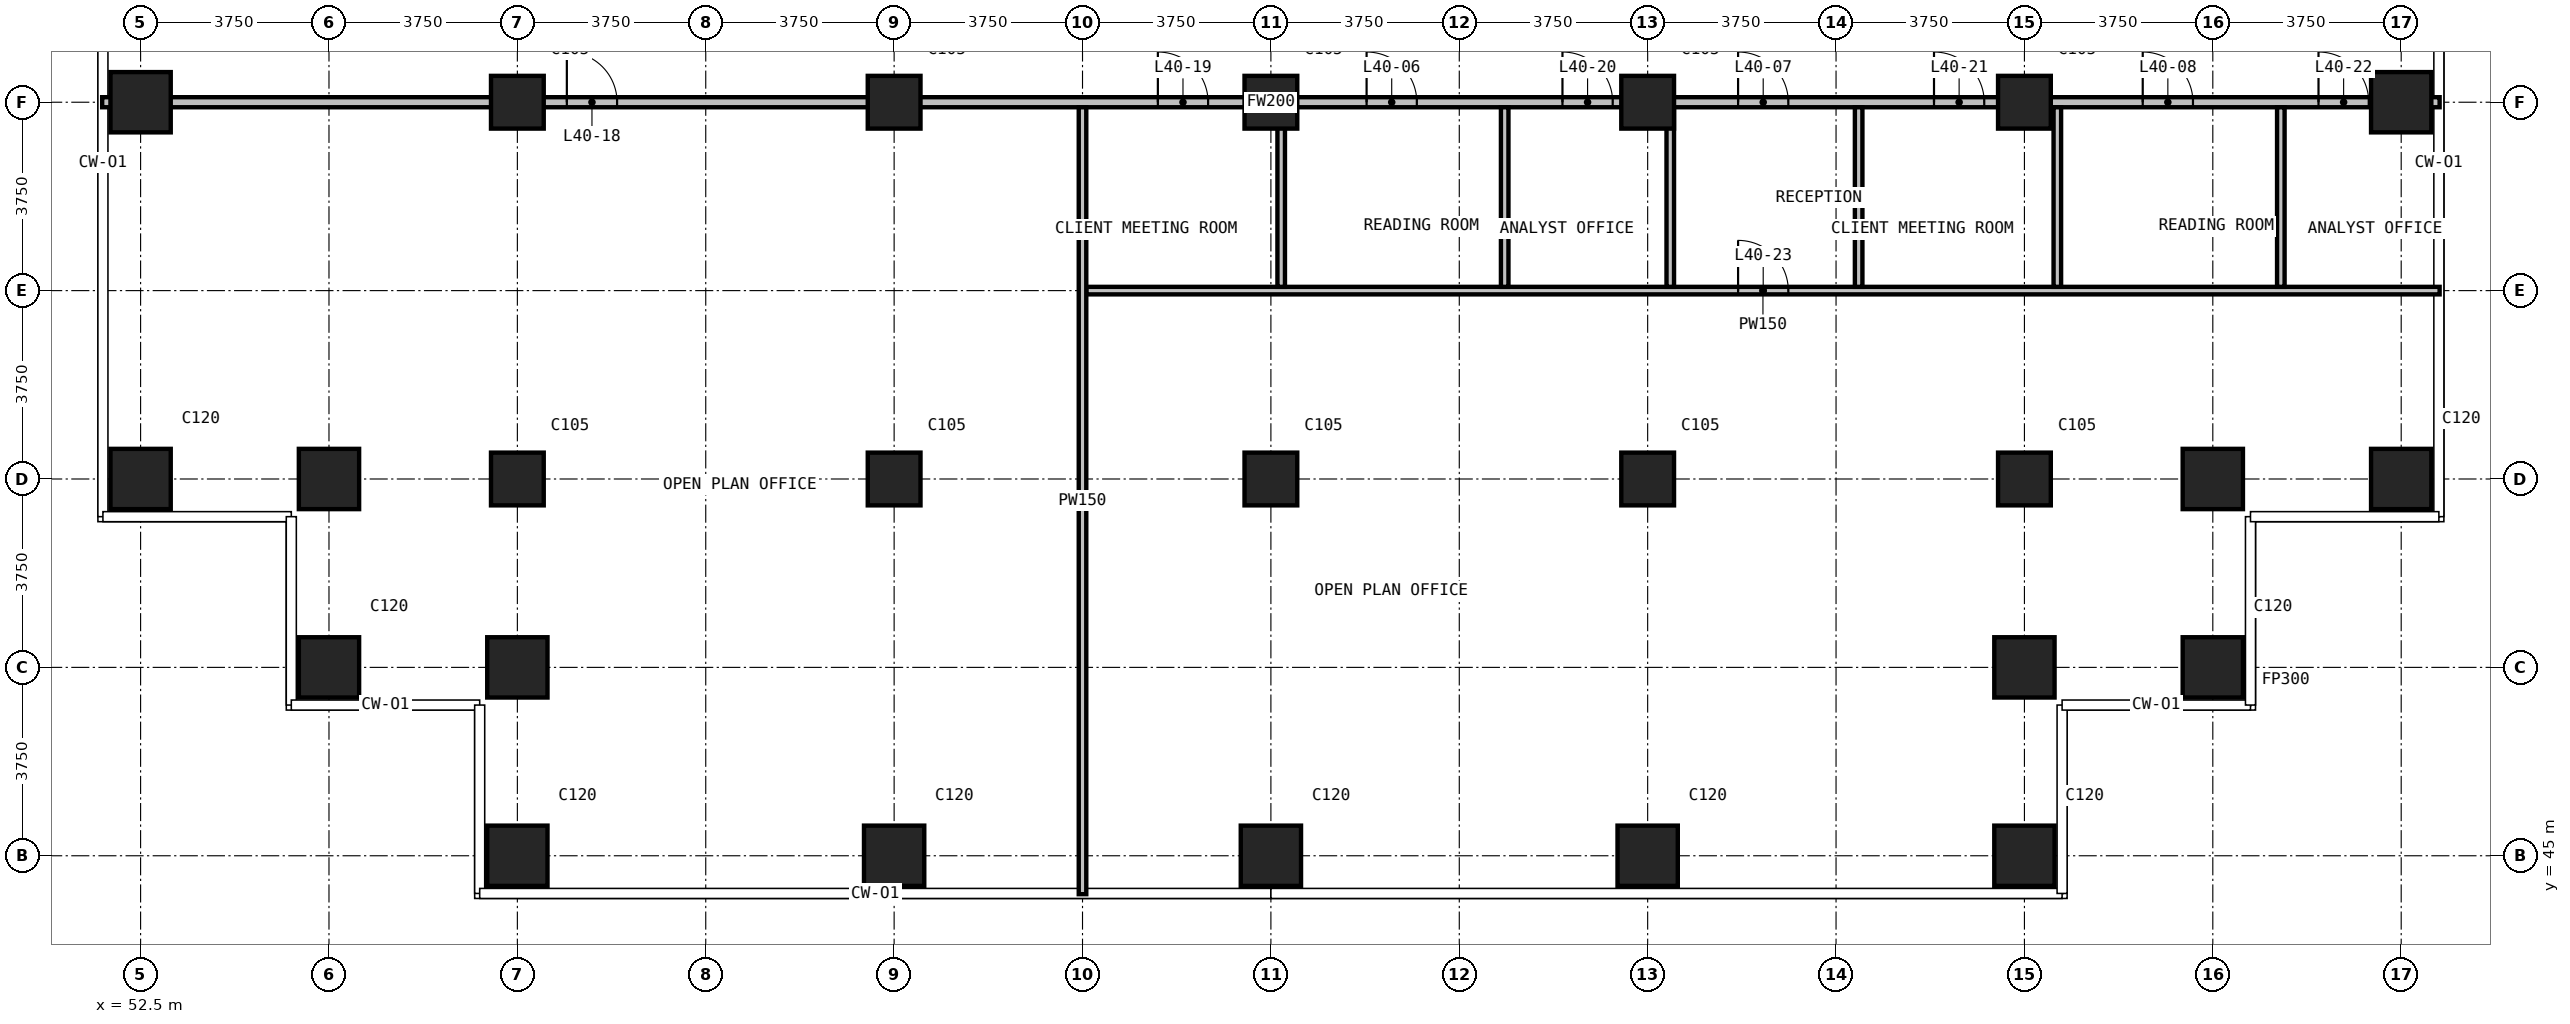
"""IFC4 building model, lengths in metres.
Left out: names, types, materials, properties, quantities, classifications, styles, units other than length and angle.
Written with IfcOpenShell. Run it as: python <this file> out.ifc"""

import sys

from ifc_helpers import new_model, si_unit, direction, frame, frame_2d, origin, origin_2d, place, context, subcontext, project, spatial, rectangle, extrude, element, fill, save


model = new_model("IFC4")
c1 = context("Model", 3, precision=1e-05, world=origin(), true_north=direction((0.0, 1.0)))
c2 = subcontext(c1, "Body", "Model", "MODEL_VIEW")
j1 = project(units=[si_unit("LENGTHUNIT", "METRE"), si_unit("PLANEANGLEUNIT", "RADIAN")], contexts=[c1])
p1 = place(None, origin())
s1 = spatial("IfcSite", under=j1, at=p1, CompositionType="ELEMENT")
p2 = place(p1, origin())
s2 = spatial("IfcBuilding", under=s1, at=p2, CompositionType="ELEMENT")
p3 = place(p2, frame((0.0, 0.0, 158.5)))
s3 = spatial("IfcBuildingStorey", under=s2, at=p3, CompositionType="ELEMENT", Elevation=158.5)
for number, where, z_axis, x_axis in (
    (1, (52.5, 52.5, 0.0), (0.0, 0.0, 1.0), (1.0, 0.0, 0.0)),
    (2, (52.5, 60.0, 0.0), (0.0, 0.0, 1.0), (1.0, 0.0, 0.0)),
    (3, (56.25, 48.75, 0.0), (0.0, 0.0, 1.0), (1.0, 0.0, 0.0)),
    (4, (56.25, 52.5, 0.0), (0.0, 0.0, 1.0), (1.0, 0.0, 0.0)),
    (5, (60.0, 45.0, 0.0), (0.0, 0.0, 1.0), (1.0, 0.0, 0.0)),
    (6, (60.0, 48.75, 0.0), (0.0, 0.0, 1.0), (1.0, 0.0, 0.0)),
):
    element("IfcColumn", number, at=place(p3, frame(where, z_axis=z_axis, x_axis=x_axis)), inside=s3, PredefinedType="COLUMN", context=c2, shape_type="SweptSolid", body=[
        extrude(rectangle(XDim=1.2, YDim=1.2, at=origin_2d()), origin(), (0.0, 0.0, 1.0), 3.6),
    ])
for number, where, z_axis, x_axis in (
    (7, (60.0, 52.5, 0.0), (0.0, 0.0, 1.0), (1.0, 0.0, 0.0)),
    (8, (60.0, 60.0, 0.0), (0.0, 0.0, 1.0), (1.0, 0.0, 0.0)),
):
    element("IfcColumn", number, at=place(p3, frame(where, z_axis=z_axis, x_axis=x_axis)), inside=s3, PredefinedType="COLUMN", context=c2, shape_type="SweptSolid", body=[
        extrude(rectangle(XDim=1.05, YDim=1.05, at=origin_2d()), origin(), (0.0, 0.0, 1.0), 3.6),
    ])
p4 = place(p3, frame((67.5, 45.0, 0.0), z_axis=(0.0, 0.0, 1.0), x_axis=(1.0, 0.0, 0.0)))
e9 = element("IfcColumn", 9, at=p4, inside=s3, PredefinedType="COLUMN", context=c2, shape_type="SweptSolid", body=[
    extrude(rectangle(XDim=1.2, YDim=1.2, at=origin_2d()), origin(), (0.0, 0.0, 1.0), 3.6),
])
for number, where, z_axis, x_axis in (
    (10, (67.5, 52.5, 0.0), (0.0, 0.0, 1.0), (1.0, 0.0, 0.0)),
    (11, (67.5, 60.0, 0.0), (0.0, 0.0, 1.0), (1.0, 0.0, 0.0)),
):
    element("IfcColumn", number, at=place(p3, frame(where, z_axis=z_axis, x_axis=x_axis)), inside=s3, PredefinedType="COLUMN", context=c2, shape_type="SweptSolid", body=[
        extrude(rectangle(XDim=1.05, YDim=1.05, at=origin_2d()), origin(), (0.0, 0.0, 1.0), 3.6),
    ])
p5 = place(p3, frame((75.0, 45.0, 0.0), z_axis=(0.0, 0.0, 1.0), x_axis=(1.0, 0.0, 0.0)))
e12 = element("IfcColumn", 12, at=p5, inside=s3, PredefinedType="COLUMN", context=c2, shape_type="SweptSolid", body=[
    extrude(rectangle(XDim=1.2, YDim=1.2, at=origin_2d()), origin(), (0.0, 0.0, 1.0), 3.6),
])
for number, where, z_axis, x_axis in (
    (13, (75.0, 52.5, 0.0), (0.0, 0.0, 1.0), (1.0, 0.0, 0.0)),
    (14, (75.0, 60.0, 0.0), (0.0, 0.0, 1.0), (1.0, 0.0, 0.0)),
):
    element("IfcColumn", number, at=place(p3, frame(where, z_axis=z_axis, x_axis=x_axis)), inside=s3, PredefinedType="COLUMN", context=c2, shape_type="SweptSolid", body=[
        extrude(rectangle(XDim=1.05, YDim=1.05, at=origin_2d()), origin(), (0.0, 0.0, 1.0), 3.6),
    ])
p6 = place(p3, frame((82.5, 45.0, 0.0), z_axis=(0.0, 0.0, 1.0), x_axis=(1.0, 0.0, 0.0)))
e15 = element("IfcColumn", 15, at=p6, inside=s3, PredefinedType="COLUMN", context=c2, shape_type="SweptSolid", body=[
    extrude(rectangle(XDim=1.2, YDim=1.2, at=origin_2d()), origin(), (0.0, 0.0, 1.0), 3.6),
])
for number, where, z_axis, x_axis in (
    (16, (82.5, 52.5, 0.0), (0.0, 0.0, 1.0), (1.0, 0.0, 0.0)),
    (17, (82.5, 60.0, 0.0), (0.0, 0.0, 1.0), (1.0, 0.0, 0.0)),
):
    element("IfcColumn", number, at=place(p3, frame(where, z_axis=z_axis, x_axis=x_axis)), inside=s3, PredefinedType="COLUMN", context=c2, shape_type="SweptSolid", body=[
        extrude(rectangle(XDim=1.05, YDim=1.05, at=origin_2d()), origin(), (0.0, 0.0, 1.0), 3.6),
    ])
for number, where, z_axis, x_axis in (
    (18, (90.0, 45.0, 0.0), (0.0, 0.0, 1.0), (1.0, 0.0, 0.0)),
    (19, (90.0, 48.75, 0.0), (0.0, 0.0, 1.0), (1.0, 0.0, 0.0)),
):
    element("IfcColumn", number, at=place(p3, frame(where, z_axis=z_axis, x_axis=x_axis)), inside=s3, PredefinedType="COLUMN", context=c2, shape_type="SweptSolid", body=[
        extrude(rectangle(XDim=1.2, YDim=1.2, at=origin_2d()), origin(), (0.0, 0.0, 1.0), 3.6),
    ])
for number, where, z_axis, x_axis in (
    (20, (90.0, 52.5, 0.0), (0.0, 0.0, 1.0), (1.0, 0.0, 0.0)),
    (21, (90.0, 60.0, 0.0), (0.0, 0.0, 1.0), (1.0, 0.0, 0.0)),
):
    element("IfcColumn", number, at=place(p3, frame(where, z_axis=z_axis, x_axis=x_axis)), inside=s3, PredefinedType="COLUMN", context=c2, shape_type="SweptSolid", body=[
        extrude(rectangle(XDim=1.05, YDim=1.05, at=origin_2d()), origin(), (0.0, 0.0, 1.0), 3.6),
    ])
for number, where, z_axis, x_axis in (
    (22, (93.75, 48.75, 0.0), (0.0, 0.0, 1.0), (1.0, 0.0, 0.0)),
    (23, (93.75, 52.5, 0.0), (0.0, 0.0, 1.0), (1.0, 0.0, 0.0)),
    (24, (97.5, 52.5, 0.0), (0.0, 0.0, 1.0), (1.0, 0.0, 0.0)),
    (25, (97.5, 60.0, 0.0), (0.0, 0.0, 1.0), (1.0, 0.0, 0.0)),
):
    element("IfcColumn", number, at=place(p3, frame(where, z_axis=z_axis, x_axis=x_axis)), inside=s3, PredefinedType="COLUMN", context=c2, shape_type="SweptSolid", body=[
        extrude(rectangle(XDim=1.2, YDim=1.2, at=origin_2d()), origin(), (0.0, 0.0, 1.0), 3.6),
    ])
p7 = place(p3, frame((51.735, 60.0, 0.0), z_axis=(0.0, 0.0, 1.0), x_axis=(1.0, 0.0, 0.0)))
e26 = element("IfcWall", 26, at=p7, inside=s3, PredefinedType="PARTITIONING", context=c2, shape_type="SweptSolid", body=[
    extrude(rectangle(XDim=46.53, YDim=0.2, at=frame_2d((23.265, 0.0))), origin(), (0.0, 0.0, 1.0), 3.3),
])
p8 = place(p7, frame((25.17, 0.0, 0.0)))
e27 = element("IfcOpeningElement", 27, at=p8, cuts=e26, PredefinedType="OPENING", context=c2, shape_type="SweptSolid", body=[
    extrude(rectangle(XDim=1.0, YDim=2.2, at=frame_2d((0.5, 1.1))), frame((0.0, 0.11, 0.0), z_axis=(0.0, -1.0, 0.0), x_axis=(1.0, 0.0, 0.0)), (0.0, 0.0, 1.0), 0.22),
])
p9 = place(p7, frame((32.565, 0.0, 0.0)))
e28 = element("IfcOpeningElement", 28, at=p9, cuts=e26, PredefinedType="OPENING", context=c2, shape_type="SweptSolid", body=[
    extrude(rectangle(XDim=1.0, YDim=2.2, at=frame_2d((0.5, 1.1))), frame((0.0, 0.11, 0.0), z_axis=(0.0, -1.0, 0.0), x_axis=(1.0, 0.0, 0.0)), (0.0, 0.0, 1.0), 0.22),
])
p10 = place(p7, frame((40.62, 0.0, 0.0)))
e29 = element("IfcOpeningElement", 29, at=p10, cuts=e26, PredefinedType="OPENING", context=c2, shape_type="SweptSolid", body=[
    extrude(rectangle(XDim=1.0, YDim=2.2, at=frame_2d((0.5, 1.1))), frame((0.0, 0.11, 0.0), z_axis=(0.0, -1.0, 0.0), x_axis=(1.0, 0.0, 0.0)), (0.0, 0.0, 1.0), 0.22),
])
p11 = place(p7, frame((9.25, 0.0, 0.0)))
e30 = element("IfcOpeningElement", 30, at=p11, cuts=e26, PredefinedType="OPENING", context=c2, shape_type="SweptSolid", body=[
    extrude(rectangle(XDim=1.0, YDim=2.2, at=frame_2d((0.5, 1.1))), frame((0.0, 0.11, 0.0), z_axis=(0.0, -1.0, 0.0), x_axis=(1.0, 0.0, 0.0)), (0.0, 0.0, 1.0), 0.22),
])
p12 = place(p7, frame((21.015, 0.0, 0.0)))
e31 = element("IfcOpeningElement", 31, at=p12, cuts=e26, PredefinedType="OPENING", context=c2, shape_type="SweptSolid", body=[
    extrude(rectangle(XDim=1.0, YDim=2.2, at=frame_2d((0.5, 1.1))), frame((0.0, 0.11, 0.0), z_axis=(0.0, -1.0, 0.0), x_axis=(1.0, 0.0, 0.0)), (0.0, 0.0, 1.0), 0.22),
])
p13 = place(p7, frame((29.069, 0.0, 0.0)))
e32 = element("IfcOpeningElement", 32, at=p13, cuts=e26, PredefinedType="OPENING", context=c2, shape_type="SweptSolid", body=[
    extrude(rectangle(XDim=1.0, YDim=2.2, at=frame_2d((0.5, 1.1))), frame((0.0, 0.11, 0.0), z_axis=(0.0, -1.0, 0.0), x_axis=(1.0, 0.0, 0.0)), (0.0, 0.0, 1.0), 0.22),
])
p14 = place(p7, frame((36.465, 0.0, 0.0)))
e33 = element("IfcOpeningElement", 33, at=p14, cuts=e26, PredefinedType="OPENING", context=c2, shape_type="SweptSolid", body=[
    extrude(rectangle(XDim=1.0, YDim=2.2, at=frame_2d((0.5, 1.1))), frame((0.0, 0.11, 0.0), z_axis=(0.0, -1.0, 0.0), x_axis=(1.0, 0.0, 0.0)), (0.0, 0.0, 1.0), 0.22),
])
p15 = place(p7, frame((44.119, 0.0, 0.0)))
e34 = element("IfcOpeningElement", 34, at=p15, cuts=e26, PredefinedType="OPENING", context=c2, shape_type="SweptSolid", body=[
    extrude(rectangle(XDim=1.0, YDim=2.2, at=frame_2d((0.5, 1.1))), frame((0.0, 0.11, 0.0), z_axis=(0.0, -1.0, 0.0), x_axis=(1.0, 0.0, 0.0)), (0.0, 0.0, 1.0), 0.22),
])
p16 = place(p3, frame((71.325, 56.25, 0.0), z_axis=(0.0, 0.0, 1.0), x_axis=(1.0, 0.0, 0.0)))
e35 = element("IfcWall", 35, at=p16, inside=s3, PredefinedType="PARTITIONING", context=c2, shape_type="SweptSolid", body=[
    extrude(rectangle(XDim=26.94, YDim=0.15, at=frame_2d((13.47, 0.0))), origin(), (0.0, 0.0, 1.0), 3.3),
])
p17 = place(p16, frame((12.975, 0.0, 0.0)))
e36 = element("IfcOpeningElement", 36, at=p17, cuts=e35, PredefinedType="OPENING", context=c2, shape_type="SweptSolid", body=[
    extrude(rectangle(XDim=1.0, YDim=2.2, at=frame_2d((0.5, 1.1))), frame((0.0, 0.085, 0.0), z_axis=(0.0, -1.0, 0.0), x_axis=(1.0, 0.0, 0.0)), (0.0, 0.0, 1.0), 0.17),
])
p18 = place(p3, frame((71.25, 44.235, 0.0), z_axis=(0.0, 0.0, 1.0), x_axis=(0.0, 1.0, 0.0)))
e37 = element("IfcWall", 37, at=p18, inside=s3, PredefinedType="PARTITIONING", context=c2, shape_type="SweptSolid", body=[
    extrude(rectangle(XDim=15.665, YDim=0.15, at=frame_2d((7.833, 0.0))), origin(), (0.0, 0.0, 1.0), 3.3),
])
for number, where, z_axis, x_axis in (
    (38, (75.205, 56.325, 0.0), (0.0, 0.0, 1.0), (0.0, 1.0, 0.0)),
    (39, (79.654, 56.325, 0.0), (0.0, 0.0, 1.0), (0.0, 1.0, 0.0)),
    (40, (82.95, 56.325, 0.0), (0.0, 0.0, 1.0), (0.0, 1.0, 0.0)),
    (41, (86.7, 56.325, 0.0), (0.0, 0.0, 1.0), (0.0, 1.0, 0.0)),
    (42, (90.655, 56.325, 0.0), (0.0, 0.0, 1.0), (0.0, 1.0, 0.0)),
    (43, (95.104, 56.325, 0.0), (0.0, 0.0, 1.0), (0.0, 1.0, 0.0)),
):
    element("IfcWall", number, at=place(p3, frame(where, z_axis=z_axis, x_axis=x_axis)), inside=s3, PredefinedType="PARTITIONING", context=c2, shape_type="SweptSolid", body=[
        extrude(rectangle(XDim=3.575, YDim=0.15, at=frame_2d((1.788, 0.0))), origin(), (0.0, 0.0, 1.0), 3.3),
    ])
p19 = place(p8, origin())
e44 = element("IfcDoor", 44, at=p19, inside=s3, OperationType="SINGLE_SWING_LEFT", PredefinedType="DOOR", context=c2, shape_type="SweptSolid", body=[
    extrude(rectangle(XDim=1.0, YDim=2.2, at=frame_2d((0.5, 1.1))), frame((0.0, 0.025, 0.0), z_axis=(0.0, -1.0, 0.0), x_axis=(1.0, 0.0, 0.0)), (0.0, 0.0, 1.0), 0.05),
])
fill(e27, e44)
p20 = place(p9, origin())
e45 = element("IfcDoor", 45, at=p20, inside=s3, OperationType="SINGLE_SWING_LEFT", PredefinedType="DOOR", context=c2, shape_type="SweptSolid", body=[
    extrude(rectangle(XDim=1.0, YDim=2.2, at=frame_2d((0.5, 1.1))), frame((0.0, 0.025, 0.0), z_axis=(0.0, -1.0, 0.0), x_axis=(1.0, 0.0, 0.0)), (0.0, 0.0, 1.0), 0.05),
])
fill(e28, e45)
p21 = place(p10, origin())
e46 = element("IfcDoor", 46, at=p21, inside=s3, OperationType="SINGLE_SWING_RIGHT", PredefinedType="DOOR", context=c2, shape_type="SweptSolid", body=[
    extrude(rectangle(XDim=1.0, YDim=2.2, at=frame_2d((0.5, 1.1))), frame((0.0, 0.025, 0.0), z_axis=(0.0, -1.0, 0.0), x_axis=(1.0, 0.0, 0.0)), (0.0, 0.0, 1.0), 0.05),
])
fill(e29, e46)
p22 = place(p11, origin())
e47 = element("IfcDoor", 47, at=p22, inside=s3, OperationType="SINGLE_SWING_LEFT", PredefinedType="DOOR", context=c2, shape_type="SweptSolid", body=[
    extrude(rectangle(XDim=1.0, YDim=2.2, at=frame_2d((0.5, 1.1))), frame((0.0, 0.025, 0.0), z_axis=(0.0, -1.0, 0.0), x_axis=(1.0, 0.0, 0.0)), (0.0, 0.0, 1.0), 0.05),
])
fill(e30, e47)
p23 = place(p12, origin())
e48 = element("IfcDoor", 48, at=p23, inside=s3, OperationType="SINGLE_SWING_LEFT", PredefinedType="DOOR", context=c2, shape_type="SweptSolid", body=[
    extrude(rectangle(XDim=1.0, YDim=2.2, at=frame_2d((0.5, 1.1))), frame((0.0, 0.025, 0.0), z_axis=(0.0, -1.0, 0.0), x_axis=(1.0, 0.0, 0.0)), (0.0, 0.0, 1.0), 0.05),
])
fill(e31, e48)
p24 = place(p13, origin())
e49 = element("IfcDoor", 49, at=p24, inside=s3, OperationType="SINGLE_SWING_LEFT", PredefinedType="DOOR", context=c2, shape_type="SweptSolid", body=[
    extrude(rectangle(XDim=1.0, YDim=2.2, at=frame_2d((0.5, 1.1))), frame((0.0, 0.025, 0.0), z_axis=(0.0, -1.0, 0.0), x_axis=(1.0, 0.0, 0.0)), (0.0, 0.0, 1.0), 0.05),
])
fill(e32, e49)
p25 = place(p14, origin())
e50 = element("IfcDoor", 50, at=p25, inside=s3, OperationType="SINGLE_SWING_LEFT", PredefinedType="DOOR", context=c2, shape_type="SweptSolid", body=[
    extrude(rectangle(XDim=1.0, YDim=2.2, at=frame_2d((0.5, 1.1))), frame((0.0, 0.025, 0.0), z_axis=(0.0, -1.0, 0.0), x_axis=(1.0, 0.0, 0.0)), (0.0, 0.0, 1.0), 0.05),
])
fill(e33, e50)
p26 = place(p15, origin())
e51 = element("IfcDoor", 51, at=p26, inside=s3, OperationType="SINGLE_SWING_LEFT", PredefinedType="DOOR", context=c2, shape_type="SweptSolid", body=[
    extrude(rectangle(XDim=1.0, YDim=2.2, at=frame_2d((0.5, 1.1))), frame((0.0, 0.025, 0.0), z_axis=(0.0, -1.0, 0.0), x_axis=(1.0, 0.0, 0.0)), (0.0, 0.0, 1.0), 0.05),
])
fill(e34, e51)
p27 = place(p17, origin())
e52 = element("IfcDoor", 52, at=p27, inside=s3, OperationType="SINGLE_SWING_LEFT", PredefinedType="DOOR", context=c2, shape_type="SweptSolid", body=[
    extrude(rectangle(XDim=1.0, YDim=2.2, at=frame_2d((0.5, 1.1))), frame((0.0, 0.025, 0.0), z_axis=(0.0, -1.0, 0.0), x_axis=(1.0, 0.0, 0.0)), (0.0, 0.0, 1.0), 0.05),
])
fill(e36, e52)
save(model, sys.argv[1])
